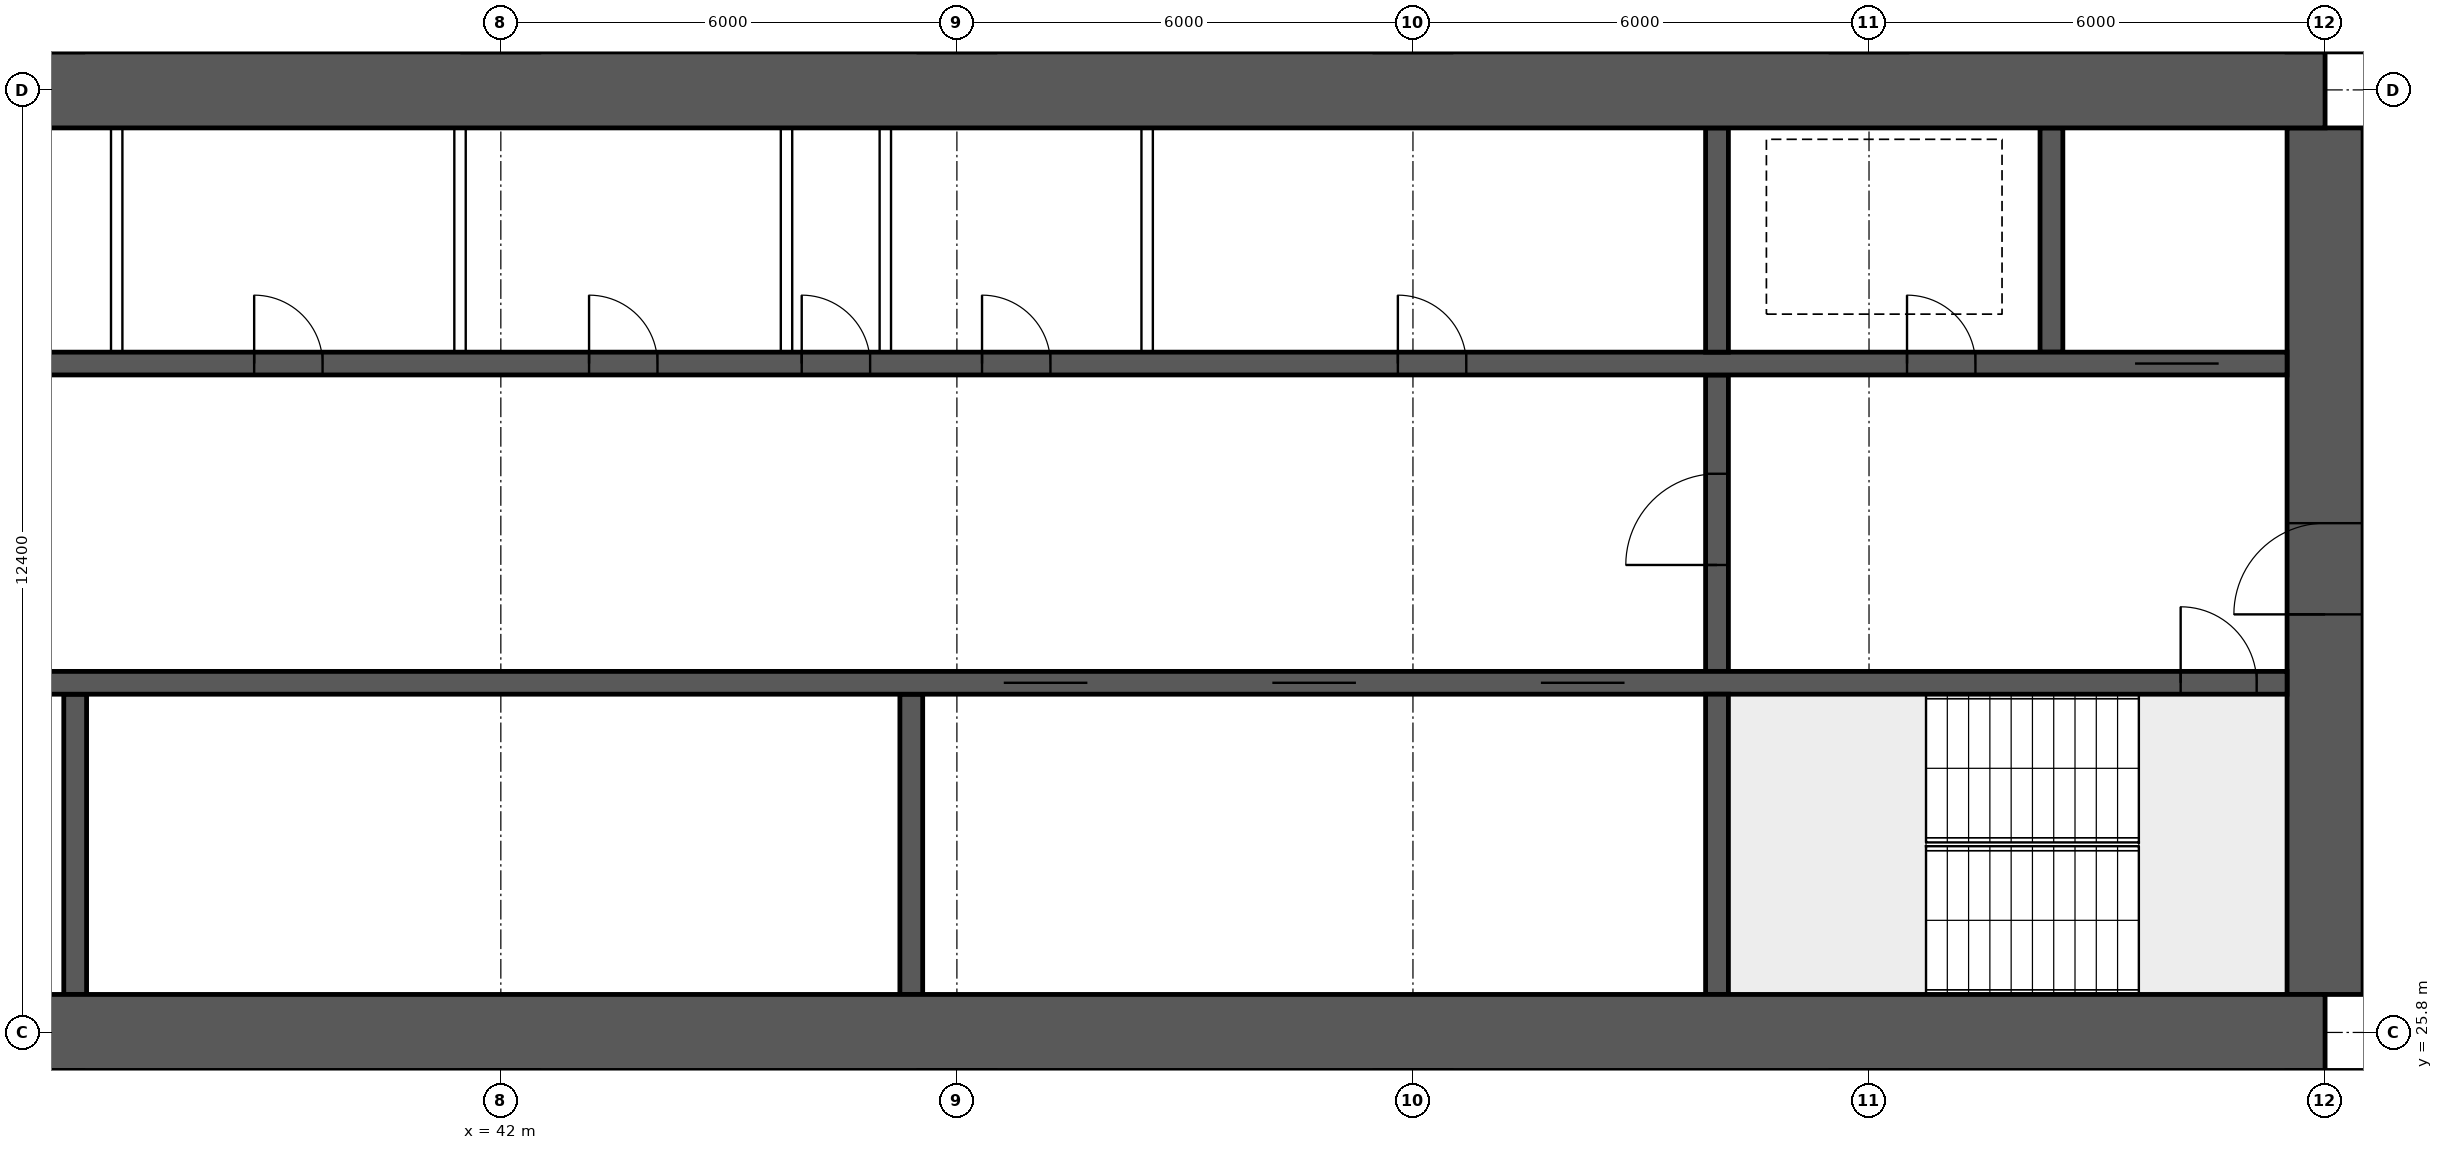
"""IFC4 building model, lengths in metres.
Left out: names, types, materials, properties, quantities, classifications, styles, units other than length and angle.
Written with IfcOpenShell. Run it as: python <this file> out.ifc"""

import sys

from ifc_helpers import new_model, si_unit, direction, frame, frame_2d, origin, place, context, subcontext, project, spatial, rectangle, extrude, element, fill, save


model = new_model("IFC4")
c1 = context("Model", 3, precision=1e-05, world=origin(), true_north=direction((0.0, 1.0)))
c2 = subcontext(c1, "Body", "Model", "MODEL_VIEW")
j1 = project(units=[si_unit("LENGTHUNIT", "METRE"), si_unit("PLANEANGLEUNIT", "RADIAN")], contexts=[c1])
p1 = place(None, origin())
s1 = spatial("IfcSite", under=j1, at=p1, CompositionType="ELEMENT")
p2 = place(p1, origin())
s2 = spatial("IfcBuilding", under=s1, at=p2, CompositionType="ELEMENT")
p3 = place(p2, frame((0.0, 0.0, 57.7)))
s3 = spatial("IfcBuildingStorey", under=s2, at=p3, CompositionType="ELEMENT", Elevation=57.7)
for number, where, z_axis, x_axis in (
    (1, (18.0, 25.8, 0.0), (0.0, 0.0, 1.0), (1.0, 0.0, 0.0)),
    (2, (18.0, 38.2, 0.0), (0.0, 0.0, 1.0), (1.0, 0.0, 0.0)),
):
    element("IfcWall", number, at=place(p3, frame(where, z_axis=z_axis, x_axis=x_axis)), inside=s3, PredefinedType="SHEAR", context=c2, shape_type="SweptSolid", body=[
        extrude(rectangle(XDim=48.0, YDim=1.0, at=frame_2d((24.0, 0.0))), origin(), (0.0, 0.0, 1.0), 3.75),
    ])
p4 = place(p3, frame((66.0, 26.3, 0.0), z_axis=(0.0, 0.0, 1.0), x_axis=(0.0, 1.0, 0.0)))
e3 = element("IfcWall", 3, at=p4, inside=s3, PredefinedType="SHEAR", context=c2, shape_type="SweptSolid", body=[
    extrude(rectangle(XDim=11.4, YDim=1.0, at=frame_2d((5.7, 0.0))), origin(), (0.0, 0.0, 1.0), 3.75),
])
p5 = place(p4, frame((5.0, 0.0, 0.0)))
e4 = element("IfcOpeningElement", 4, at=p5, cuts=e3, PredefinedType="OPENING", context=c2, shape_type="SweptSolid", body=[
    extrude(rectangle(XDim=1.2, YDim=2.1, at=frame_2d((0.6, 1.05))), frame((0.0, 0.51, 0.0), z_axis=(0.0, -1.0, 0.0), x_axis=(1.0, 0.0, 0.0)), (0.0, 0.0, 1.0), 1.02),
])
p6 = place(p3, frame((18.5, 30.4, 0.0), z_axis=(0.0, 0.0, 1.0), x_axis=(1.0, 0.0, 0.0)))
e5 = element("IfcWall", 5, at=p6, inside=s3, PredefinedType="SHEAR", context=c2, shape_type="SweptSolid", body=[
    extrude(rectangle(XDim=47.0, YDim=0.3, at=frame_2d((23.5, 0.0))), origin(), (0.0, 0.0, 1.0), 3.75),
])
p7 = place(p6, frame((0.4, 0.0, 0.0)))
e6 = element("IfcOpeningElement", 6, at=p7, cuts=e5, PredefinedType="OPENING", context=c2, shape_type="SweptSolid", body=[
    extrude(rectangle(XDim=1.0, YDim=2.1, at=frame_2d((0.5, 1.05))), frame((0.0, 0.16, 0.0), z_axis=(0.0, -1.0, 0.0), x_axis=(1.0, 0.0, 0.0)), (0.0, 0.0, 1.0), 0.32),
])
p8 = place(p6, frame((45.6, 0.0, 0.0)))
e7 = element("IfcOpeningElement", 7, at=p8, cuts=e5, PredefinedType="OPENING", context=c2, shape_type="SweptSolid", body=[
    extrude(rectangle(XDim=1.0, YDim=2.1, at=frame_2d((0.5, 1.05))), frame((0.0, 0.16, 0.0), z_axis=(0.0, -1.0, 0.0), x_axis=(1.0, 0.0, 0.0)), (0.0, 0.0, 1.0), 0.32),
])
p9 = place(p6, frame((8.25, 0.0, 0.0)))
e8 = element("IfcOpeningElement", 8, at=p9, cuts=e5, PredefinedType="OPENING", context=c2, shape_type="SweptSolid", body=[
    extrude(rectangle(XDim=1.1, YDim=2.1, at=frame_2d((0.55, 1.05))), frame((0.0, 0.16, 0.0), z_axis=(0.0, -1.0, 0.0), x_axis=(1.0, 0.0, 0.0)), (0.0, 0.0, 1.0), 0.32),
])
p10 = place(p6, frame((10.85, 0.0, 0.0)))
e9 = element("IfcOpeningElement", 9, at=p10, cuts=e5, PredefinedType="OPENING", context=c2, shape_type="SweptSolid", body=[
    extrude(rectangle(XDim=1.1, YDim=2.1, at=frame_2d((0.55, 1.05))), frame((0.0, 0.16, 0.0), z_axis=(0.0, -1.0, 0.0), x_axis=(1.0, 0.0, 0.0)), (0.0, 0.0, 1.0), 0.32),
])
p11 = place(p6, frame((13.45, 0.0, 0.0)))
e10 = element("IfcOpeningElement", 10, at=p11, cuts=e5, PredefinedType="OPENING", context=c2, shape_type="SweptSolid", body=[
    extrude(rectangle(XDim=1.1, YDim=2.1, at=frame_2d((0.55, 1.05))), frame((0.0, 0.16, 0.0), z_axis=(0.0, -1.0, 0.0), x_axis=(1.0, 0.0, 0.0)), (0.0, 0.0, 1.0), 0.32),
])
p12 = place(p6, frame((16.05, 0.0, 0.0)))
e11 = element("IfcOpeningElement", 11, at=p12, cuts=e5, PredefinedType="OPENING", context=c2, shape_type="SweptSolid", body=[
    extrude(rectangle(XDim=1.1, YDim=2.1, at=frame_2d((0.55, 1.05))), frame((0.0, 0.16, 0.0), z_axis=(0.0, -1.0, 0.0), x_axis=(1.0, 0.0, 0.0)), (0.0, 0.0, 1.0), 0.32),
])
p13 = place(p6, frame((30.117, 0.0, 0.0)))
e12 = element("IfcOpeningElement", 12, at=p13, cuts=e5, PredefinedType="OPENING", context=c2, shape_type="SweptSolid", body=[
    extrude(rectangle(XDim=1.1, YDim=2.1, at=frame_2d((0.55, 1.05))), frame((0.0, 0.16, 0.0), z_axis=(0.0, -1.0, 0.0), x_axis=(1.0, 0.0, 0.0)), (0.0, 0.0, 1.0), 0.32),
])
p14 = place(p6, frame((33.65, 0.0, 0.0)))
e13 = element("IfcOpeningElement", 13, at=p14, cuts=e5, PredefinedType="OPENING", context=c2, shape_type="SweptSolid", body=[
    extrude(rectangle(XDim=1.1, YDim=2.1, at=frame_2d((0.55, 1.05))), frame((0.0, 0.16, 0.0), z_axis=(0.0, -1.0, 0.0), x_axis=(1.0, 0.0, 0.0)), (0.0, 0.0, 1.0), 0.32),
])
p15 = place(p6, frame((37.183, 0.0, 0.0)))
e14 = element("IfcOpeningElement", 14, at=p15, cuts=e5, PredefinedType="OPENING", context=c2, shape_type="SweptSolid", body=[
    extrude(rectangle(XDim=1.1, YDim=2.1, at=frame_2d((0.55, 1.05))), frame((0.0, 0.16, 0.0), z_axis=(0.0, -1.0, 0.0), x_axis=(1.0, 0.0, 0.0)), (0.0, 0.0, 1.0), 0.32),
])
p16 = place(p3, frame((18.5, 34.6, 0.0), z_axis=(0.0, 0.0, 1.0), x_axis=(1.0, 0.0, 0.0)))
e15 = element("IfcWall", 15, at=p16, inside=s3, PredefinedType="SHEAR", context=c2, shape_type="SweptSolid", body=[
    extrude(rectangle(XDim=47.0, YDim=0.3, at=frame_2d((23.5, 0.0))), origin(), (0.0, 0.0, 1.0), 3.75),
])
p17 = place(p16, frame((0.9, 0.0, 0.0)))
e16 = element("IfcOpeningElement", 16, at=p17, cuts=e15, PredefinedType="OPENING", context=c2, shape_type="SweptSolid", body=[
    extrude(rectangle(XDim=1.1, YDim=2.1, at=frame_2d((0.55, 1.05))), frame((0.0, 0.16, 0.0), z_axis=(0.0, -1.0, 0.0), x_axis=(1.0, 0.0, 0.0)), (0.0, 0.0, 1.0), 0.32),
])
p18 = place(p16, frame((45.0, 0.0, 0.0)))
e17 = element("IfcOpeningElement", 17, at=p18, cuts=e15, PredefinedType="OPENING", context=c2, shape_type="SweptSolid", body=[
    extrude(rectangle(XDim=1.1, YDim=2.1, at=frame_2d((0.55, 1.05))), frame((0.0, 0.16, 0.0), z_axis=(0.0, -1.0, 0.0), x_axis=(1.0, 0.0, 0.0)), (0.0, 0.0, 1.0), 0.32),
])
p19 = place(p16, frame((4.1, 0.0, 0.0)))
e18 = element("IfcOpeningElement", 18, at=p19, cuts=e15, PredefinedType="OPENING", context=c2, shape_type="SweptSolid", body=[
    extrude(rectangle(XDim=0.9, YDim=2.1, at=frame_2d((0.45, 1.05))), frame((0.0, 0.16, 0.0), z_axis=(0.0, -1.0, 0.0), x_axis=(1.0, 0.0, 0.0)), (0.0, 0.0, 1.0), 0.32),
])
p20 = place(p16, frame((42.0, 0.0, 0.0)))
e19 = element("IfcOpeningElement", 19, at=p20, cuts=e15, PredefinedType="OPENING", context=c2, shape_type="SweptSolid", body=[
    extrude(rectangle(XDim=0.9, YDim=2.1, at=frame_2d((0.45, 1.05))), frame((0.0, 0.16, 0.0), z_axis=(0.0, -1.0, 0.0), x_axis=(1.0, 0.0, 0.0)), (0.0, 0.0, 1.0), 0.32),
])
p21 = place(p16, frame((8.875, 0.0, 0.0)))
e20 = element("IfcOpeningElement", 20, at=p21, cuts=e15, PredefinedType="OPENING", context=c2, shape_type="SweptSolid", body=[
    extrude(rectangle(XDim=0.9, YDim=2.1, at=frame_2d((0.45, 1.05))), frame((0.0, 0.16, 0.0), z_axis=(0.0, -1.0, 0.0), x_axis=(1.0, 0.0, 0.0)), (0.0, 0.0, 1.0), 0.32),
])
p22 = place(p16, frame((12.849, 0.0, 0.0)))
e21 = element("IfcOpeningElement", 21, at=p22, cuts=e15, PredefinedType="OPENING", context=c2, shape_type="SweptSolid", body=[
    extrude(rectangle(XDim=0.9, YDim=2.1, at=frame_2d((0.45, 1.05))), frame((0.0, 0.16, 0.0), z_axis=(0.0, -1.0, 0.0), x_axis=(1.0, 0.0, 0.0)), (0.0, 0.0, 1.0), 0.32),
])
p23 = place(p16, frame((16.496, 0.0, 0.0)))
e22 = element("IfcOpeningElement", 22, at=p23, cuts=e15, PredefinedType="OPENING", context=c2, shape_type="SweptSolid", body=[
    extrude(rectangle(XDim=0.9, YDim=2.1, at=frame_2d((0.45, 1.05))), frame((0.0, 0.16, 0.0), z_axis=(0.0, -1.0, 0.0), x_axis=(1.0, 0.0, 0.0)), (0.0, 0.0, 1.0), 0.32),
])
p24 = place(p16, frame((20.255, 0.0, 0.0)))
e23 = element("IfcOpeningElement", 23, at=p24, cuts=e15, PredefinedType="OPENING", context=c2, shape_type="SweptSolid", body=[
    extrude(rectangle(XDim=0.9, YDim=2.1, at=frame_2d((0.45, 1.05))), frame((0.0, 0.16, 0.0), z_axis=(0.0, -1.0, 0.0), x_axis=(1.0, 0.0, 0.0)), (0.0, 0.0, 1.0), 0.32),
])
p25 = place(p16, frame((24.661, 0.0, 0.0)))
e24 = element("IfcOpeningElement", 24, at=p25, cuts=e15, PredefinedType="OPENING", context=c2, shape_type="SweptSolid", body=[
    extrude(rectangle(XDim=0.9, YDim=2.1, at=frame_2d((0.45, 1.05))), frame((0.0, 0.16, 0.0), z_axis=(0.0, -1.0, 0.0), x_axis=(1.0, 0.0, 0.0)), (0.0, 0.0, 1.0), 0.32),
])
p26 = place(p16, frame((27.458, 0.0, 0.0)))
e25 = element("IfcOpeningElement", 25, at=p26, cuts=e15, PredefinedType="OPENING", context=c2, shape_type="SweptSolid", body=[
    extrude(rectangle(XDim=0.9, YDim=2.1, at=frame_2d((0.45, 1.05))), frame((0.0, 0.16, 0.0), z_axis=(0.0, -1.0, 0.0), x_axis=(1.0, 0.0, 0.0)), (0.0, 0.0, 1.0), 0.32),
])
p27 = place(p16, frame((29.831, 0.0, 0.0)))
e26 = element("IfcOpeningElement", 26, at=p27, cuts=e15, PredefinedType="OPENING", context=c2, shape_type="SweptSolid", body=[
    extrude(rectangle(XDim=0.9, YDim=2.1, at=frame_2d((0.45, 1.05))), frame((0.0, 0.16, 0.0), z_axis=(0.0, -1.0, 0.0), x_axis=(1.0, 0.0, 0.0)), (0.0, 0.0, 1.0), 0.32),
])
p28 = place(p16, frame((35.302, 0.0, 0.0)))
e27 = element("IfcOpeningElement", 27, at=p28, cuts=e15, PredefinedType="OPENING", context=c2, shape_type="SweptSolid", body=[
    extrude(rectangle(XDim=0.9, YDim=2.1, at=frame_2d((0.45, 1.05))), frame((0.0, 0.16, 0.0), z_axis=(0.0, -1.0, 0.0), x_axis=(1.0, 0.0, 0.0)), (0.0, 0.0, 1.0), 0.32),
])
p29 = place(p3, frame((58.0, 26.3, 0.0), z_axis=(0.0, 0.0, 1.0), x_axis=(0.0, 1.0, 0.0)))
e28 = element("IfcWall", 28, at=p29, inside=s3, PredefinedType="SHEAR", context=c2, shape_type="SweptSolid", body=[
    extrude(rectangle(XDim=3.95, YDim=0.3, at=frame_2d((1.975, 0.0))), origin(), (0.0, 0.0, 1.0), 3.75),
])
p30 = place(p3, frame((58.0, 30.55, 0.0), z_axis=(0.0, 0.0, 1.0), x_axis=(0.0, 1.0, 0.0)))
e29 = element("IfcWall", 29, at=p30, inside=s3, PredefinedType="SHEAR", context=c2, shape_type="SweptSolid", body=[
    extrude(rectangle(XDim=3.9, YDim=0.3, at=frame_2d((1.95, 0.0))), origin(), (0.0, 0.0, 1.0), 3.75),
])
p31 = place(p30, frame((1.4, 0.0, 0.0)))
e30 = element("IfcOpeningElement", 30, at=p31, cuts=e29, PredefinedType="OPENING", context=c2, shape_type="SweptSolid", body=[
    extrude(rectangle(XDim=1.2, YDim=2.1, at=frame_2d((0.6, 1.05))), frame((0.0, 0.16, 0.0), z_axis=(0.0, -1.0, 0.0), x_axis=(1.0, 0.0, 0.0)), (0.0, 0.0, 1.0), 0.32),
])
for number, where, z_axis, x_axis in (
    (31, (62.4, 34.75, 0.0), (0.0, 0.0, 1.0), (0.0, 1.0, 0.0)),
    (32, (58.0, 34.75, 0.0), (0.0, 0.0, 1.0), (0.0, 1.0, 0.0)),
):
    element("IfcWall", number, at=place(p3, frame(where, z_axis=z_axis, x_axis=x_axis)), inside=s3, PredefinedType="SHEAR", context=c2, shape_type="SweptSolid", body=[
        extrude(rectangle(XDim=2.95, YDim=0.3, at=frame_2d((1.475, 0.0))), origin(), (0.0, 0.0, 1.0), 3.75),
    ])
for number, where, z_axis, x_axis in (
    (33, (36.4, 26.3, 0.0), (0.0, 0.0, 1.0), (0.0, 1.0, 0.0)),
    (34, (47.4, 26.3, 0.0), (0.0, 0.0, 1.0), (0.0, 1.0, 0.0)),
):
    element("IfcWall", number, at=place(p3, frame(where, z_axis=z_axis, x_axis=x_axis)), inside=s3, PredefinedType="SHEAR", context=c2, shape_type="SweptSolid", body=[
        extrude(rectangle(XDim=3.95, YDim=0.3, at=frame_2d((1.975, 0.0))), origin(), (0.0, 0.0, 1.0), 3.75),
    ])
for number, where, z_axis, x_axis in (
    (35, (36.946, 34.75, 0.0), (0.0, 0.0, 1.0), (0.0, 1.0, 0.0)),
    (36, (41.463, 34.75, 0.0), (0.0, 0.0, 1.0), (0.0, 1.0, 0.0)),
    (37, (45.758, 34.75, 0.0), (0.0, 0.0, 1.0), (0.0, 1.0, 0.0)),
    (38, (47.058, 34.75, 0.0), (0.0, 0.0, 1.0), (0.0, 1.0, 0.0)),
    (39, (50.503, 34.75, 0.0), (0.0, 0.0, 1.0), (0.0, 1.0, 0.0)),
):
    element("IfcWall", number, at=place(p3, frame(where, z_axis=z_axis, x_axis=x_axis)), inside=s3, PredefinedType="SOLIDWALL", context=c2, shape_type="SweptSolid", body=[
        extrude(rectangle(XDim=2.95, YDim=0.15, at=frame_2d((1.475, 0.0))), origin(), (0.0, 0.0, 1.0), 3.5),
    ])
for number, where, z_axis, x_axis in (
    (40, (39.075, 14.9, 0.0), (0.0, 0.0, 1.0), (0.0, 1.0, 0.0)),
    (41, (45.21, 14.9, 0.0), (0.0, 0.0, 1.0), (0.0, 1.0, 0.0)),
    (42, (56.78, 14.9, 0.0), (0.0, 0.0, 1.0), (0.0, 1.0, 0.0)),
    (43, (62.095, 14.9, 0.0), (0.0, 0.0, 1.0), (0.0, 1.0, 0.0)),
):
    element("IfcWall", number, at=place(p3, frame(where, z_axis=z_axis, x_axis=x_axis)), inside=s3, PredefinedType="PARTITIONING", context=c2, shape_type="SweptSolid", body=[
        extrude(rectangle(XDim=10.4, YDim=0.15, at=frame_2d((5.2, 0.0))), origin(), (0.0, 0.0, 1.0), 3.5),
    ])
p32 = place(p5, origin())
e44 = element("IfcDoor", 44, at=p32, inside=s3, OperationType="SINGLE_SWING_LEFT", PredefinedType="DOOR", context=c2, shape_type="SweptSolid", body=[
    extrude(rectangle(XDim=1.2, YDim=2.1, at=frame_2d((0.6, 1.05))), frame((0.0, 0.025, 0.0), z_axis=(0.0, -1.0, 0.0), x_axis=(1.0, 0.0, 0.0)), (0.0, 0.0, 1.0), 0.05),
])
fill(e4, e44)
p33 = place(p8, origin())
e45 = element("IfcDoor", 45, at=p33, inside=s3, OperationType="SINGLE_SWING_LEFT", PredefinedType="DOOR", context=c2, shape_type="SweptSolid", body=[
    extrude(rectangle(XDim=1.0, YDim=2.1, at=frame_2d((0.5, 1.05))), frame((0.0, 0.025, 0.0), z_axis=(0.0, -1.0, 0.0), x_axis=(1.0, 0.0, 0.0)), (0.0, 0.0, 1.0), 0.05),
])
fill(e7, e45)
p34 = place(p18, origin())
e46 = element("IfcDoor", 46, at=p34, inside=s3, OperationType="DOUBLE_DOOR_SLIDING", PredefinedType="DOOR", context=c2, shape_type="SweptSolid", body=[
    extrude(rectangle(XDim=1.1, YDim=2.1, at=frame_2d((0.55, 1.05))), frame((0.0, 0.025, 0.0), z_axis=(0.0, -1.0, 0.0), x_axis=(1.0, 0.0, 0.0)), (0.0, 0.0, 1.0), 0.05),
])
fill(e17, e46)
p35 = place(p20, origin())
e47 = element("IfcDoor", 47, at=p35, inside=s3, OperationType="SINGLE_SWING_LEFT", PredefinedType="DOOR", context=c2, shape_type="SweptSolid", body=[
    extrude(rectangle(XDim=0.9, YDim=2.1, at=frame_2d((0.45, 1.05))), frame((0.0, 0.025, 0.0), z_axis=(0.0, -1.0, 0.0), x_axis=(1.0, 0.0, 0.0)), (0.0, 0.0, 1.0), 0.05),
])
fill(e19, e47)
p36 = place(p31, origin())
e48 = element("IfcDoor", 48, at=p36, inside=s3, OperationType="SINGLE_SWING_LEFT", PredefinedType="DOOR", context=c2, shape_type="SweptSolid", body=[
    extrude(rectangle(XDim=1.2, YDim=2.1, at=frame_2d((0.6, 1.05))), frame((0.0, 0.025, 0.0), z_axis=(0.0, -1.0, 0.0), x_axis=(1.0, 0.0, 0.0)), (0.0, 0.0, 1.0), 0.05),
])
fill(e30, e48)
p37 = place(p24, origin())
e49 = element("IfcDoor", 49, at=p37, inside=s3, OperationType="SINGLE_SWING_LEFT", PredefinedType="DOOR", context=c2, shape_type="SweptSolid", body=[
    extrude(rectangle(XDim=0.9, YDim=2.1, at=frame_2d((0.45, 1.05))), frame((0.0, 0.025, 0.0), z_axis=(0.0, -1.0, 0.0), x_axis=(1.0, 0.0, 0.0)), (0.0, 0.0, 1.0), 0.05),
])
fill(e23, e49)
p38 = place(p25, origin())
e50 = element("IfcDoor", 50, at=p38, inside=s3, OperationType="SINGLE_SWING_LEFT", PredefinedType="DOOR", context=c2, shape_type="SweptSolid", body=[
    extrude(rectangle(XDim=0.9, YDim=2.1, at=frame_2d((0.45, 1.05))), frame((0.0, 0.025, 0.0), z_axis=(0.0, -1.0, 0.0), x_axis=(1.0, 0.0, 0.0)), (0.0, 0.0, 1.0), 0.05),
])
fill(e24, e50)
p39 = place(p26, origin())
e51 = element("IfcDoor", 51, at=p39, inside=s3, OperationType="SINGLE_SWING_LEFT", PredefinedType="DOOR", context=c2, shape_type="SweptSolid", body=[
    extrude(rectangle(XDim=0.9, YDim=2.1, at=frame_2d((0.45, 1.05))), frame((0.0, 0.025, 0.0), z_axis=(0.0, -1.0, 0.0), x_axis=(1.0, 0.0, 0.0)), (0.0, 0.0, 1.0), 0.05),
])
fill(e25, e51)
p40 = place(p27, origin())
e52 = element("IfcDoor", 52, at=p40, inside=s3, OperationType="SINGLE_SWING_LEFT", PredefinedType="DOOR", context=c2, shape_type="SweptSolid", body=[
    extrude(rectangle(XDim=0.9, YDim=2.1, at=frame_2d((0.45, 1.05))), frame((0.0, 0.025, 0.0), z_axis=(0.0, -1.0, 0.0), x_axis=(1.0, 0.0, 0.0)), (0.0, 0.0, 1.0), 0.05),
])
fill(e26, e52)
p41 = place(p28, origin())
e53 = element("IfcDoor", 53, at=p41, inside=s3, OperationType="SINGLE_SWING_LEFT", PredefinedType="DOOR", context=c2, shape_type="SweptSolid", body=[
    extrude(rectangle(XDim=0.9, YDim=2.1, at=frame_2d((0.45, 1.05))), frame((0.0, 0.025, 0.0), z_axis=(0.0, -1.0, 0.0), x_axis=(1.0, 0.0, 0.0)), (0.0, 0.0, 1.0), 0.05),
])
fill(e27, e53)
p42 = place(p13, origin())
e54 = element("IfcDoor", 54, at=p42, inside=s3, OperationType="DOUBLE_DOOR_SLIDING", PredefinedType="DOOR", context=c2, shape_type="SweptSolid", body=[
    extrude(rectangle(XDim=1.1, YDim=2.1, at=frame_2d((0.55, 1.05))), frame((0.0, 0.025, 0.0), z_axis=(0.0, -1.0, 0.0), x_axis=(1.0, 0.0, 0.0)), (0.0, 0.0, 1.0), 0.05),
])
fill(e12, e54)
p43 = place(p14, origin())
e55 = element("IfcDoor", 55, at=p43, inside=s3, OperationType="DOUBLE_DOOR_SLIDING", PredefinedType="DOOR", context=c2, shape_type="SweptSolid", body=[
    extrude(rectangle(XDim=1.1, YDim=2.1, at=frame_2d((0.55, 1.05))), frame((0.0, 0.025, 0.0), z_axis=(0.0, -1.0, 0.0), x_axis=(1.0, 0.0, 0.0)), (0.0, 0.0, 1.0), 0.05),
])
fill(e13, e55)
p44 = place(p15, origin())
e56 = element("IfcDoor", 56, at=p44, inside=s3, OperationType="DOUBLE_DOOR_SLIDING", PredefinedType="DOOR", context=c2, shape_type="SweptSolid", body=[
    extrude(rectangle(XDim=1.1, YDim=2.1, at=frame_2d((0.55, 1.05))), frame((0.0, 0.025, 0.0), z_axis=(0.0, -1.0, 0.0), x_axis=(1.0, 0.0, 0.0)), (0.0, 0.0, 1.0), 0.05),
])
fill(e14, e56)
save(model, sys.argv[1])
